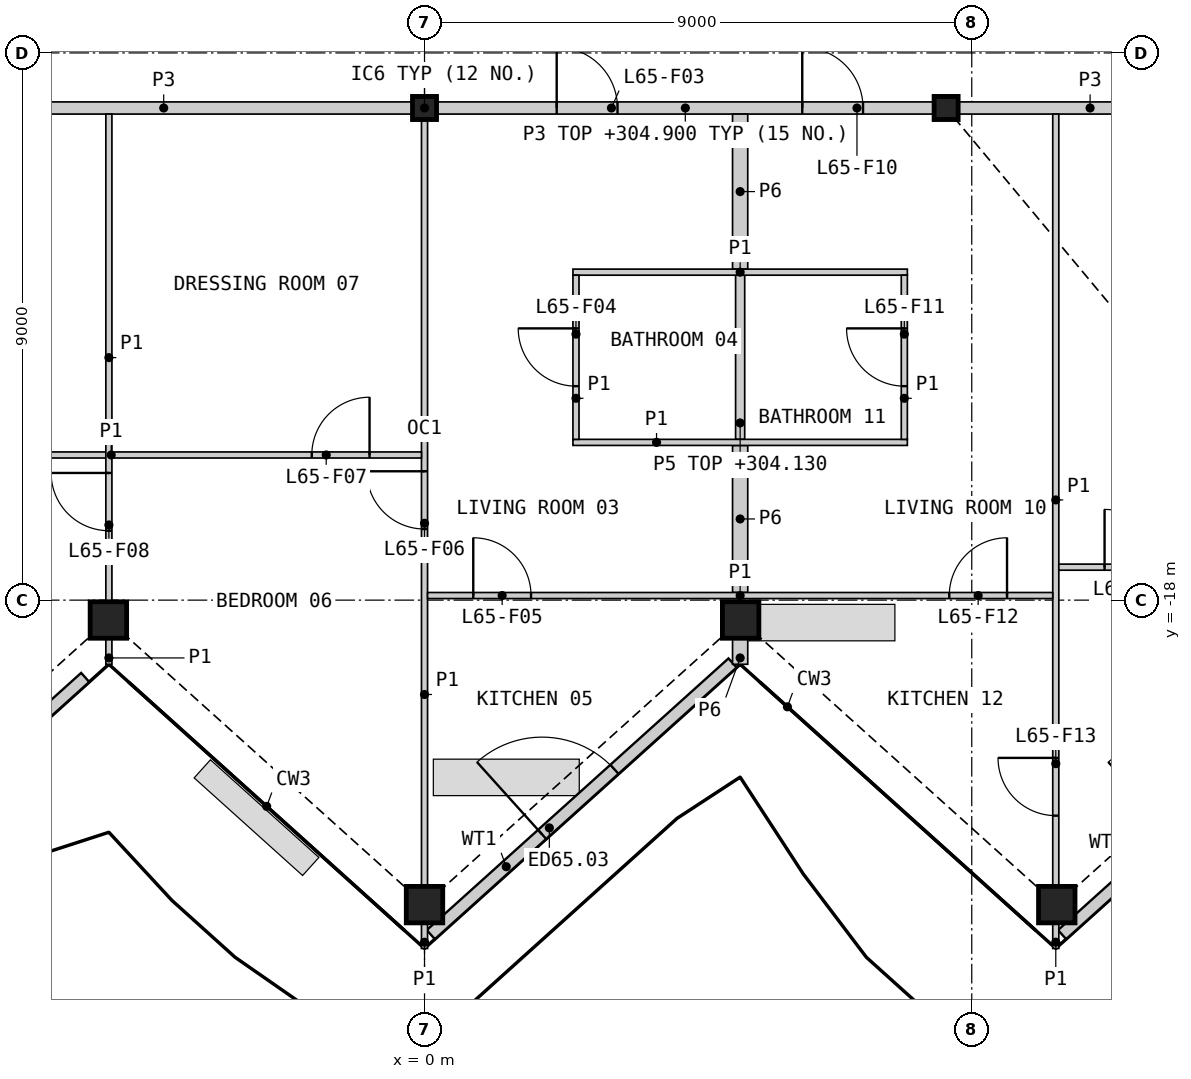
"""IFC4 building model, lengths in metres.
Left out: names, types, materials, properties, quantities, classifications, styles, units other than length and angle.
Written with IfcOpenShell. Run it as: python <this file> out.ifc"""

import sys

from ifc_helpers import new_model, si_unit, direction, frame, frame_2d, origin, origin_2d, place, context, subcontext, project, spatial, rectangle, hollow_rectangle, i_section, extrude, element, fill, save


model = new_model("IFC4")
c1 = context("Model", 3, precision=1e-05, world=origin(), true_north=direction((0.0, 1.0)))
c2 = subcontext(c1, "Body", "Model", "MODEL_VIEW")
j1 = project(units=[si_unit("LENGTHUNIT", "METRE"), si_unit("PLANEANGLEUNIT", "RADIAN")], contexts=[c1])
p1 = place(None, origin())
s1 = spatial("IfcSite", under=j1, at=p1, CompositionType="ELEMENT")
p2 = place(p1, origin())
s2 = spatial("IfcBuilding", under=s1, at=p2, CompositionType="ELEMENT")
p3 = place(p2, frame((0.0, 0.0, 301.8)))
s3 = spatial("IfcBuildingStorey", under=s2, at=p3, CompositionType="ELEMENT", Elevation=301.8)
for number, where, z_axis, x_axis in (
    (1, (-5.199, -18.327, 0.0), (0.0, 0.0, 1.0), (1.0, 0.0, 0.0)),
    (2, (0.0, -23.008, 0.0), (0.0, 0.0, 1.0), (1.0, 0.0, 0.0)),
    (3, (5.199, -18.327, 0.0), (0.0, 0.0, 1.0), (1.0, 0.0, 0.0)),
    (4, (10.398, -23.008, 0.0), (0.0, 0.0, 1.0), (1.0, 0.0, 0.0)),
):
    element("IfcColumn", number, at=place(p3, frame(where, z_axis=z_axis, x_axis=x_axis)), inside=s3, PredefinedType="COLUMN", context=c2, shape_type="SweptSolid", body=[
        extrude(hollow_rectangle(XDim=0.6, YDim=0.6, WallThickness=0.04, at=origin_2d()), origin(), (0.0, 0.0, 1.0), 3.4),
    ])
for number, where, z_axis, x_axis in (
    (5, (0.0, -9.906, 0.0), (0.0, 0.0, 1.0), (1.0, 0.0, 0.0)),
    (6, (8.578, -9.906, 0.0), (0.0, 0.0, 1.0), (1.0, 0.0, 0.0)),
):
    element("IfcColumn", number, at=place(p3, frame(where, z_axis=z_axis, x_axis=x_axis)), inside=s3, PredefinedType="COLUMN", context=c2, shape_type="SweptSolid", body=[
        extrude(i_section(OverallWidth=0.396, OverallDepth=0.381, WebThickness=0.019, FlangeThickness=0.03, at=origin_2d()), origin(), (0.0, 0.0, 1.0), 3.4),
    ])
p4 = place(p3, frame((-10.203, -23.434, 0.0), z_axis=(0.0, 0.0, 1.0), x_axis=(0.74314582041, 0.669129501373, 0.0)))
e7 = element("IfcWall", 7, at=p4, inside=s3, PredefinedType="SOLIDWALL", context=c2, shape_type="SweptSolid", body=[
    extrude(rectangle(XDim=6.221, YDim=0.2, at=frame_2d((3.11, 0.0))), origin(), (0.0, 0.0, 1.0), 2.488),
])
p5 = place(p4, frame((2.362, 0.0, 0.0)))
e8 = element("IfcOpeningElement", 8, at=p5, cuts=e7, PredefinedType="OPENING", context=c2, shape_type="SweptSolid", body=[
    extrude(rectangle(XDim=1.6, YDim=2.25, at=frame_2d((0.8, 1.125))), frame((0.0, 0.11, 0.0), z_axis=(0.0, -1.0, 0.0), x_axis=(1.0, 0.0, 0.0)), (0.0, 0.0, 1.0), 0.22),
])
p6 = place(p3, frame((0.104, -23.501, 0.0), z_axis=(0.0, 0.0, 1.0), x_axis=(0.743137782456, 0.669138428344, 0.0)))
e9 = element("IfcWall", 9, at=p6, inside=s3, PredefinedType="SOLIDWALL", context=c2, shape_type="SweptSolid", body=[
    extrude(rectangle(XDim=6.678, YDim=0.2, at=frame_2d((3.339, 0.0))), origin(), (0.0, 0.0, 1.0), 2.488),
])
p7 = place(p6, frame((2.463, 0.0, 0.0)))
e10 = element("IfcOpeningElement", 10, at=p7, cuts=e9, PredefinedType="OPENING", context=c2, shape_type="SweptSolid", body=[
    extrude(rectangle(XDim=1.6, YDim=2.25, at=frame_2d((0.8, 1.125))), frame((0.0, 0.11, 0.0), z_axis=(0.0, -1.0, 0.0), x_axis=(1.0, 0.0, 0.0)), (0.0, 0.0, 1.0), 0.22),
])
p8 = place(p3, frame((10.485, -23.501, 0.0), z_axis=(0.0, 0.0, 1.0), x_axis=(0.743134744054, 0.669141802745, 0.0)))
e11 = element("IfcWall", 11, at=p8, inside=s3, PredefinedType="SOLIDWALL", context=c2, shape_type="SweptSolid", body=[
    extrude(rectangle(XDim=6.322, YDim=0.2, at=frame_2d((3.161, 0.0))), origin(), (0.0, 0.0, 1.0), 2.488),
])
p9 = place(p8, frame((2.463, 0.0, 0.0)))
e12 = element("IfcOpeningElement", 12, at=p9, cuts=e11, PredefinedType="OPENING", context=c2, shape_type="SweptSolid", body=[
    extrude(rectangle(XDim=1.6, YDim=2.25, at=frame_2d((0.8, 1.125))), frame((0.0, 0.11, 0.0), z_axis=(0.0, -1.0, 0.0), x_axis=(1.0, 0.0, 0.0)), (0.0, 0.0, 1.0), 0.22),
])
p10 = place(p3, frame((0.208, -9.906, 0.0), z_axis=(0.0, 0.0, 1.0), x_axis=(1.0, 0.0, 0.0)))
e13 = element("IfcWall", 13, at=p10, inside=s3, PredefinedType="PARTITIONING", context=c2, shape_type="SweptSolid", body=[
    extrude(rectangle(XDim=8.163, YDim=0.2, at=frame_2d((4.082, 0.0))), origin(), (0.0, 0.0, 1.0), 3.1),
])
p11 = place(p10, frame((1.966, 0.0, 0.0)))
e14 = element("IfcOpeningElement", 14, at=p11, cuts=e13, PredefinedType="OPENING", context=c2, shape_type="SweptSolid", body=[
    extrude(rectangle(XDim=1.0, YDim=2.1, at=frame_2d((0.5, 1.05))), frame((0.0, 0.11, 0.0), z_axis=(0.0, -1.0, 0.0), x_axis=(1.0, 0.0, 0.0)), (0.0, 0.0, 1.0), 0.22),
])
p12 = place(p10, frame((6.004, 0.0, 0.0)))
e15 = element("IfcOpeningElement", 15, at=p12, cuts=e13, PredefinedType="OPENING", context=c2, shape_type="SweptSolid", body=[
    extrude(rectangle(XDim=1.0, YDim=2.1, at=frame_2d((0.5, 1.05))), frame((0.0, 0.11, 0.0), z_axis=(0.0, -1.0, 0.0), x_axis=(1.0, 0.0, 0.0)), (0.0, 0.0, 1.0), 0.22),
])
p13 = place(p3, frame((-8.371, -9.906, 0.0), z_axis=(0.0, 0.0, 1.0), x_axis=(1.0, 0.0, 0.0)))
e16 = element("IfcWall", 16, at=p13, inside=s3, PredefinedType="PARTITIONING", context=c2, shape_type="SweptSolid", body=[
    extrude(rectangle(XDim=8.163, YDim=0.2, at=frame_2d((4.082, 0.0))), origin(), (0.0, 0.0, 1.0), 3.1),
])
p14 = place(p3, frame((8.786, -9.906, 0.0), z_axis=(0.0, 0.0, 1.0), x_axis=(1.0, 0.0, 0.0)))
e17 = element("IfcWall", 17, at=p14, inside=s3, PredefinedType="PARTITIONING", context=c2, shape_type="SweptSolid", body=[
    extrude(rectangle(XDim=4.32, YDim=0.2, at=frame_2d((2.16, 0.0))), origin(), (0.0, 0.0, 1.0), 3.1),
])
p15 = place(p3, frame((5.191, -12.556, 0.0), z_axis=(0.0, 0.0, 1.0), x_axis=(0.0, 1.0, 0.0)))
e18 = element("IfcWall", 18, at=p15, inside=s3, PredefinedType="PARTITIONING", context=c2, shape_type="SweptSolid", body=[
    extrude(rectangle(XDim=2.55, YDim=0.25, at=frame_2d((1.275, 0.0))), origin(), (0.0, 0.0, 1.0), 2.33),
])
p16 = place(p3, frame((5.191, -17.875, 0.0), z_axis=(0.0, 0.0, 1.0), x_axis=(0.0, 1.0, 0.0)))
e19 = element("IfcWall", 19, at=p16, inside=s3, PredefinedType="PARTITIONING", context=c2, shape_type="SweptSolid", body=[
    extrude(rectangle(XDim=2.419, YDim=0.25, at=frame_2d((1.209, 0.0))), origin(), (0.0, 0.0, 1.0), 2.33),
])
p17 = place(p3, frame((5.191, -19.055, 0.0), z_axis=(0.0, 0.0, 1.0), x_axis=(0.0, 1.0, 0.0)))
e20 = element("IfcWall", 20, at=p17, inside=s3, PredefinedType="PARTITIONING", context=c2, shape_type="SweptSolid", body=[
    extrude(rectangle(XDim=0.418, YDim=0.25, at=frame_2d((0.209, 0.0))), origin(), (0.0, 0.0, 1.0), 2.33),
])
p18 = place(p3, frame((5.191, -15.356, 0.0), z_axis=(0.0, 0.0, 1.0), x_axis=(0.0, 1.0, 0.0)))
e21 = element("IfcWall", 21, at=p18, inside=s3, PredefinedType="PLUMBINGWALL", context=c2, shape_type="SweptSolid", body=[
    extrude(rectangle(XDim=2.7, YDim=0.15, at=frame_2d((1.35, 0.0))), origin(), (0.0, 0.0, 1.0), 2.33),
])
p19 = place(p3, frame((10.382, -22.698, 0.0), z_axis=(0.0, 0.0, 1.0), x_axis=(0.0, 1.0, 0.0)))
e22 = element("IfcWall", 22, at=p19, inside=s3, PredefinedType="PARTITIONING", context=c2, shape_type="SweptSolid", body=[
    extrude(rectangle(XDim=12.692, YDim=0.1, at=frame_2d((6.346, 0.0))), origin(), (0.0, 0.0, 1.0), 2.33),
])
p20 = place(p19, frame((1.153, 0.0, 0.0)))
e23 = element("IfcOpeningElement", 23, at=p20, cuts=e22, PredefinedType="OPENING", context=c2, shape_type="SweptSolid", body=[
    extrude(rectangle(XDim=0.95, YDim=2.1, at=frame_2d((0.475, 1.05))), frame((0.0, 0.06, 0.0), z_axis=(0.0, -1.0, 0.0), x_axis=(1.0, 0.0, 0.0)), (0.0, 0.0, 1.0), 0.12),
])
p21 = place(p3, frame((0.0, -22.698, 0.0), z_axis=(0.0, 0.0, 1.0), x_axis=(0.0, 1.0, 0.0)))
e24 = element("IfcWall", 24, at=p21, inside=s3, PredefinedType="PARTITIONING", context=c2, shape_type="SweptSolid", body=[
    extrude(rectangle(XDim=12.585, YDim=0.1, at=frame_2d((6.292, 0.0))), origin(), (0.0, 0.0, 1.0), 2.33),
])
p22 = place(p21, frame((5.868, 0.0, 0.0)))
e25 = element("IfcOpeningElement", 25, at=p22, cuts=e24, PredefinedType="OPENING", context=c2, shape_type="SweptSolid", body=[
    extrude(rectangle(XDim=0.95, YDim=2.1, at=frame_2d((0.475, 1.05))), frame((0.0, 0.06, 0.0), z_axis=(0.0, -1.0, 0.0), x_axis=(1.0, 0.0, 0.0)), (0.0, 0.0, 1.0), 0.12),
])
p23 = place(p3, frame((0.05, -17.924, 0.0), z_axis=(0.0, 0.0, 1.0), x_axis=(1.0, 0.0, 0.0)))
e26 = element("IfcWall", 26, at=p23, inside=s3, PredefinedType="PARTITIONING", context=c2, shape_type="SweptSolid", body=[
    extrude(rectangle(XDim=10.282, YDim=0.1, at=frame_2d((5.141, 0.0))), origin(), (0.0, 0.0, 1.0), 2.33),
])
p24 = place(p23, frame((0.752, 0.0, 0.0)))
e27 = element("IfcOpeningElement", 27, at=p24, cuts=e26, PredefinedType="OPENING", context=c2, shape_type="SweptSolid", body=[
    extrude(rectangle(XDim=0.95, YDim=2.1, at=frame_2d((0.475, 1.05))), frame((0.0, 0.06, 0.0), z_axis=(0.0, -1.0, 0.0), x_axis=(1.0, 0.0, 0.0)), (0.0, 0.0, 1.0), 0.12),
])
p25 = place(p23, frame((8.58, 0.0, 0.0)))
e28 = element("IfcOpeningElement", 28, at=p25, cuts=e26, PredefinedType="OPENING", context=c2, shape_type="SweptSolid", body=[
    extrude(rectangle(XDim=0.95, YDim=2.1, at=frame_2d((0.475, 1.05))), frame((0.0, 0.06, 0.0), z_axis=(0.0, -1.0, 0.0), x_axis=(1.0, 0.0, 0.0)), (0.0, 0.0, 1.0), 0.12),
])
p26 = place(p3, frame((-10.257, -15.613, 0.0), z_axis=(0.0, 0.0, 1.0), x_axis=(1.0, 0.0, 0.0)))
e29 = element("IfcWall", 29, at=p26, inside=s3, PredefinedType="PARTITIONING", context=c2, shape_type="SweptSolid", body=[
    extrude(rectangle(XDim=10.207, YDim=0.1, at=frame_2d((5.104, 0.0))), origin(), (0.0, 0.0, 1.0), 2.33),
])
p27 = place(p26, frame((8.403, 0.0, 0.0)))
e30 = element("IfcOpeningElement", 30, at=p27, cuts=e29, PredefinedType="OPENING", context=c2, shape_type="SweptSolid", body=[
    extrude(rectangle(XDim=0.95, YDim=2.1, at=frame_2d((0.475, 1.05))), frame((0.0, 0.06, 0.0), z_axis=(0.0, -1.0, 0.0), x_axis=(1.0, 0.0, 0.0)), (0.0, 0.0, 1.0), 0.12),
])
p28 = place(p26, frame((0.653, 0.0, 0.0)))
e31 = element("IfcOpeningElement", 31, at=p28, cuts=e29, PredefinedType="OPENING", context=c2, shape_type="SweptSolid", body=[
    extrude(rectangle(XDim=0.95, YDim=2.1, at=frame_2d((0.475, 1.05))), frame((0.0, 0.06, 0.0), z_axis=(0.0, -1.0, 0.0), x_axis=(1.0, 0.0, 0.0)), (0.0, 0.0, 1.0), 0.12),
])
p29 = place(p3, frame((-5.191, -18.017, 0.0), z_axis=(0.0, 0.0, 1.0), x_axis=(0.0, 1.0, 0.0)))
e32 = element("IfcWall", 32, at=p29, inside=s3, PredefinedType="PARTITIONING", context=c2, shape_type="SweptSolid", body=[
    extrude(rectangle(XDim=8.011, YDim=0.1, at=frame_2d((4.006, 0.0))), origin(), (0.0, 0.0, 1.0), 2.33),
])
p30 = place(p29, frame((1.158, 0.0, 0.0)))
e33 = element("IfcOpeningElement", 33, at=p30, cuts=e32, PredefinedType="OPENING", context=c2, shape_type="SweptSolid", body=[
    extrude(rectangle(XDim=0.95, YDim=2.1, at=frame_2d((0.475, 1.05))), frame((0.0, 0.06, 0.0), z_axis=(0.0, -1.0, 0.0), x_axis=(1.0, 0.0, 0.0)), (0.0, 0.0, 1.0), 0.12),
])
p31 = place(p3, frame((10.432, -17.458, 0.0), z_axis=(0.0, 0.0, 1.0), x_axis=(1.0, 0.0, 0.0)))
e34 = element("IfcWall", 34, at=p31, inside=s3, PredefinedType="PARTITIONING", context=c2, shape_type="SweptSolid", body=[
    extrude(rectangle(XDim=6.775, YDim=0.1, at=frame_2d((3.387, 0.0))), origin(), (0.0, 0.0, 1.0), 2.33),
])
p32 = place(p31, frame((0.752, 0.0, 0.0)))
e35 = element("IfcOpeningElement", 35, at=p32, cuts=e34, PredefinedType="OPENING", context=c2, shape_type="SweptSolid", body=[
    extrude(rectangle(XDim=0.95, YDim=2.1, at=frame_2d((0.475, 1.05))), frame((0.0, 0.06, 0.0), z_axis=(0.0, -1.0, 0.0), x_axis=(1.0, 0.0, 0.0)), (0.0, 0.0, 1.0), 0.12),
])
for number, where, z_axis, x_axis in (
    (36, (2.441, -12.606, 0.0), (0.0, 0.0, 1.0), (1.0, 0.0, 0.0)),
    (37, (2.441, -15.406, 0.0), (0.0, 0.0, 1.0), (1.0, 0.0, 0.0)),
):
    element("IfcWall", number, at=place(p3, frame(where, z_axis=z_axis, x_axis=x_axis)), inside=s3, PredefinedType="PARTITIONING", context=c2, shape_type="SweptSolid", body=[
        extrude(rectangle(XDim=5.5, YDim=0.1, at=frame_2d((2.75, 0.0))), origin(), (0.0, 0.0, 1.0), 2.33),
    ])
p33 = place(p3, frame((2.491, -15.356, 0.0), z_axis=(0.0, 0.0, 1.0), x_axis=(0.0, 1.0, 0.0)))
e38 = element("IfcWall", 38, at=p33, inside=s3, PredefinedType="PARTITIONING", context=c2, shape_type="SweptSolid", body=[
    extrude(rectangle(XDim=2.7, YDim=0.1, at=frame_2d((1.35, 0.0))), origin(), (0.0, 0.0, 1.0), 2.33),
])
p34 = place(p33, frame((0.875, 0.0, 0.0)))
e39 = element("IfcOpeningElement", 39, at=p34, cuts=e38, PredefinedType="OPENING", context=c2, shape_type="SweptSolid", body=[
    extrude(rectangle(XDim=0.95, YDim=2.1, at=frame_2d((0.475, 1.05))), frame((0.0, 0.06, 0.0), z_axis=(0.0, -1.0, 0.0), x_axis=(1.0, 0.0, 0.0)), (0.0, 0.0, 1.0), 0.12),
])
p35 = place(p3, frame((7.891, -15.356, 0.0), z_axis=(0.0, 0.0, 1.0), x_axis=(0.0, 1.0, 0.0)))
e40 = element("IfcWall", 40, at=p35, inside=s3, PredefinedType="PARTITIONING", context=c2, shape_type="SweptSolid", body=[
    extrude(rectangle(XDim=2.7, YDim=0.1, at=frame_2d((1.35, 0.0))), origin(), (0.0, 0.0, 1.0), 2.33),
])
p36 = place(p35, frame((0.875, 0.0, 0.0)))
e41 = element("IfcOpeningElement", 41, at=p36, cuts=e40, PredefinedType="OPENING", context=c2, shape_type="SweptSolid", body=[
    extrude(rectangle(XDim=0.95, YDim=2.1, at=frame_2d((0.475, 1.05))), frame((0.0, 0.06, 0.0), z_axis=(0.0, -1.0, 0.0), x_axis=(1.0, 0.0, 0.0)), (0.0, 0.0, 1.0), 0.12),
])
p37 = place(p3, frame((-5.191, -19.055, 0.0), z_axis=(0.0, 0.0, 1.0), x_axis=(0.0, 1.0, 0.0)))
e42 = element("IfcWall", 42, at=p37, inside=s3, PredefinedType="PARTITIONING", context=c2, shape_type="SweptSolid", body=[
    extrude(rectangle(XDim=0.418, YDim=0.1, at=frame_2d((0.209, 0.0))), origin(), (0.0, 0.0, 1.0), 2.33),
])
for number, where, z_axis, x_axis in (
    (43, (0.0, -23.729, 0.0), (0.0, 0.0, 1.0), (0.0, 1.0, 0.0)),
    (44, (10.382, -23.729, 0.0), (0.0, 0.0, 1.0), (0.0, 1.0, 0.0)),
):
    element("IfcWall", number, at=place(p3, frame(where, z_axis=z_axis, x_axis=x_axis)), inside=s3, PredefinedType="PARTITIONING", context=c2, shape_type="SweptSolid", body=[
        extrude(rectangle(XDim=0.411, YDim=0.1, at=frame_2d((0.206, 0.0))), origin(), (0.0, 0.0, 1.0), 2.33),
    ])
p38 = place(p7, origin())
e45 = element("IfcDoor", 45, at=p38, inside=s3, OperationType="DOUBLE_DOOR_SINGLE_SWING", PredefinedType="DOOR", context=c2, shape_type="SweptSolid", body=[
    extrude(rectangle(XDim=1.6, YDim=2.25, at=frame_2d((0.8, 1.125))), frame((0.0, 0.025, 0.0), z_axis=(0.0, -1.0, 0.0), x_axis=(1.0, 0.0, 0.0)), (0.0, 0.0, 1.0), 0.05),
])
fill(e10, e45)
p39 = place(p11, origin())
e46 = element("IfcDoor", 46, at=p39, inside=s3, OperationType="SINGLE_SWING_LEFT", PredefinedType="DOOR", context=c2, shape_type="SweptSolid", body=[
    extrude(rectangle(XDim=1.0, YDim=2.1, at=frame_2d((0.5, 1.05))), frame((0.0, 0.025, 0.0), z_axis=(0.0, -1.0, 0.0), x_axis=(1.0, 0.0, 0.0)), (0.0, 0.0, 1.0), 0.05),
])
fill(e14, e46)
p40 = place(p34, origin())
e47 = element("IfcDoor", 47, at=p40, inside=s3, OperationType="SINGLE_SWING_RIGHT", PredefinedType="DOOR", context=c2, shape_type="SweptSolid", body=[
    extrude(rectangle(XDim=0.95, YDim=2.1, at=frame_2d((0.475, 1.05))), frame((0.0, 0.025, 0.0), z_axis=(0.0, -1.0, 0.0), x_axis=(1.0, 0.0, 0.0)), (0.0, 0.0, 1.0), 0.05),
])
fill(e39, e47)
p41 = place(p24, origin())
e48 = element("IfcDoor", 48, at=p41, inside=s3, OperationType="SINGLE_SWING_LEFT", PredefinedType="DOOR", context=c2, shape_type="SweptSolid", body=[
    extrude(rectangle(XDim=0.95, YDim=2.1, at=frame_2d((0.475, 1.05))), frame((0.0, 0.025, 0.0), z_axis=(0.0, -1.0, 0.0), x_axis=(1.0, 0.0, 0.0)), (0.0, 0.0, 1.0), 0.05),
])
fill(e27, e48)
p42 = place(p22, origin())
e49 = element("IfcDoor", 49, at=p42, inside=s3, OperationType="SINGLE_SWING_RIGHT", PredefinedType="DOOR", context=c2, shape_type="SweptSolid", body=[
    extrude(rectangle(XDim=0.95, YDim=2.1, at=frame_2d((0.475, 1.05))), frame((0.0, 0.025, 0.0), z_axis=(0.0, -1.0, 0.0), x_axis=(1.0, 0.0, 0.0)), (0.0, 0.0, 1.0), 0.05),
])
fill(e25, e49)
p43 = place(p27, origin())
e50 = element("IfcDoor", 50, at=p43, inside=s3, OperationType="SINGLE_SWING_RIGHT", PredefinedType="DOOR", context=c2, shape_type="SweptSolid", body=[
    extrude(rectangle(XDim=0.95, YDim=2.1, at=frame_2d((0.475, 1.05))), frame((0.0, 0.025, 0.0), z_axis=(0.0, -1.0, 0.0), x_axis=(1.0, 0.0, 0.0)), (0.0, 0.0, 1.0), 0.05),
])
fill(e30, e50)
p44 = place(p30, origin())
e51 = element("IfcDoor", 51, at=p44, inside=s3, OperationType="SINGLE_SWING_RIGHT", PredefinedType="DOOR", context=c2, shape_type="SweptSolid", body=[
    extrude(rectangle(XDim=0.95, YDim=2.1, at=frame_2d((0.475, 1.05))), frame((0.0, 0.025, 0.0), z_axis=(0.0, -1.0, 0.0), x_axis=(1.0, 0.0, 0.0)), (0.0, 0.0, 1.0), 0.05),
])
fill(e33, e51)
p45 = place(p12, origin())
e52 = element("IfcDoor", 52, at=p45, inside=s3, OperationType="SINGLE_SWING_LEFT", PredefinedType="DOOR", context=c2, shape_type="SweptSolid", body=[
    extrude(rectangle(XDim=1.0, YDim=2.1, at=frame_2d((0.5, 1.05))), frame((0.0, 0.025, 0.0), z_axis=(0.0, -1.0, 0.0), x_axis=(1.0, 0.0, 0.0)), (0.0, 0.0, 1.0), 0.05),
])
fill(e15, e52)
p46 = place(p36, origin())
e53 = element("IfcDoor", 53, at=p46, inside=s3, OperationType="SINGLE_SWING_RIGHT", PredefinedType="DOOR", context=c2, shape_type="SweptSolid", body=[
    extrude(rectangle(XDim=0.95, YDim=2.1, at=frame_2d((0.475, 1.05))), frame((0.0, 0.025, 0.0), z_axis=(0.0, -1.0, 0.0), x_axis=(1.0, 0.0, 0.0)), (0.0, 0.0, 1.0), 0.05),
])
fill(e41, e53)
p47 = place(p25, origin())
e54 = element("IfcDoor", 54, at=p47, inside=s3, OperationType="SINGLE_SWING_RIGHT", PredefinedType="DOOR", context=c2, shape_type="SweptSolid", body=[
    extrude(rectangle(XDim=0.95, YDim=2.1, at=frame_2d((0.475, 1.05))), frame((0.0, 0.025, 0.0), z_axis=(0.0, -1.0, 0.0), x_axis=(1.0, 0.0, 0.0)), (0.0, 0.0, 1.0), 0.05),
])
fill(e28, e54)
p48 = place(p20, origin())
e55 = element("IfcDoor", 55, at=p48, inside=s3, OperationType="SINGLE_SWING_RIGHT", PredefinedType="DOOR", context=c2, shape_type="SweptSolid", body=[
    extrude(rectangle(XDim=0.95, YDim=2.1, at=frame_2d((0.475, 1.05))), frame((0.0, 0.025, 0.0), z_axis=(0.0, -1.0, 0.0), x_axis=(1.0, 0.0, 0.0)), (0.0, 0.0, 1.0), 0.05),
])
fill(e23, e55)
p49 = place(p32, origin())
e56 = element("IfcDoor", 56, at=p49, inside=s3, OperationType="SINGLE_SWING_LEFT", PredefinedType="DOOR", context=c2, shape_type="SweptSolid", body=[
    extrude(rectangle(XDim=0.95, YDim=2.1, at=frame_2d((0.475, 1.05))), frame((0.0, 0.025, 0.0), z_axis=(0.0, -1.0, 0.0), x_axis=(1.0, 0.0, 0.0)), (0.0, 0.0, 1.0), 0.05),
])
fill(e35, e56)
save(model, sys.argv[1])
